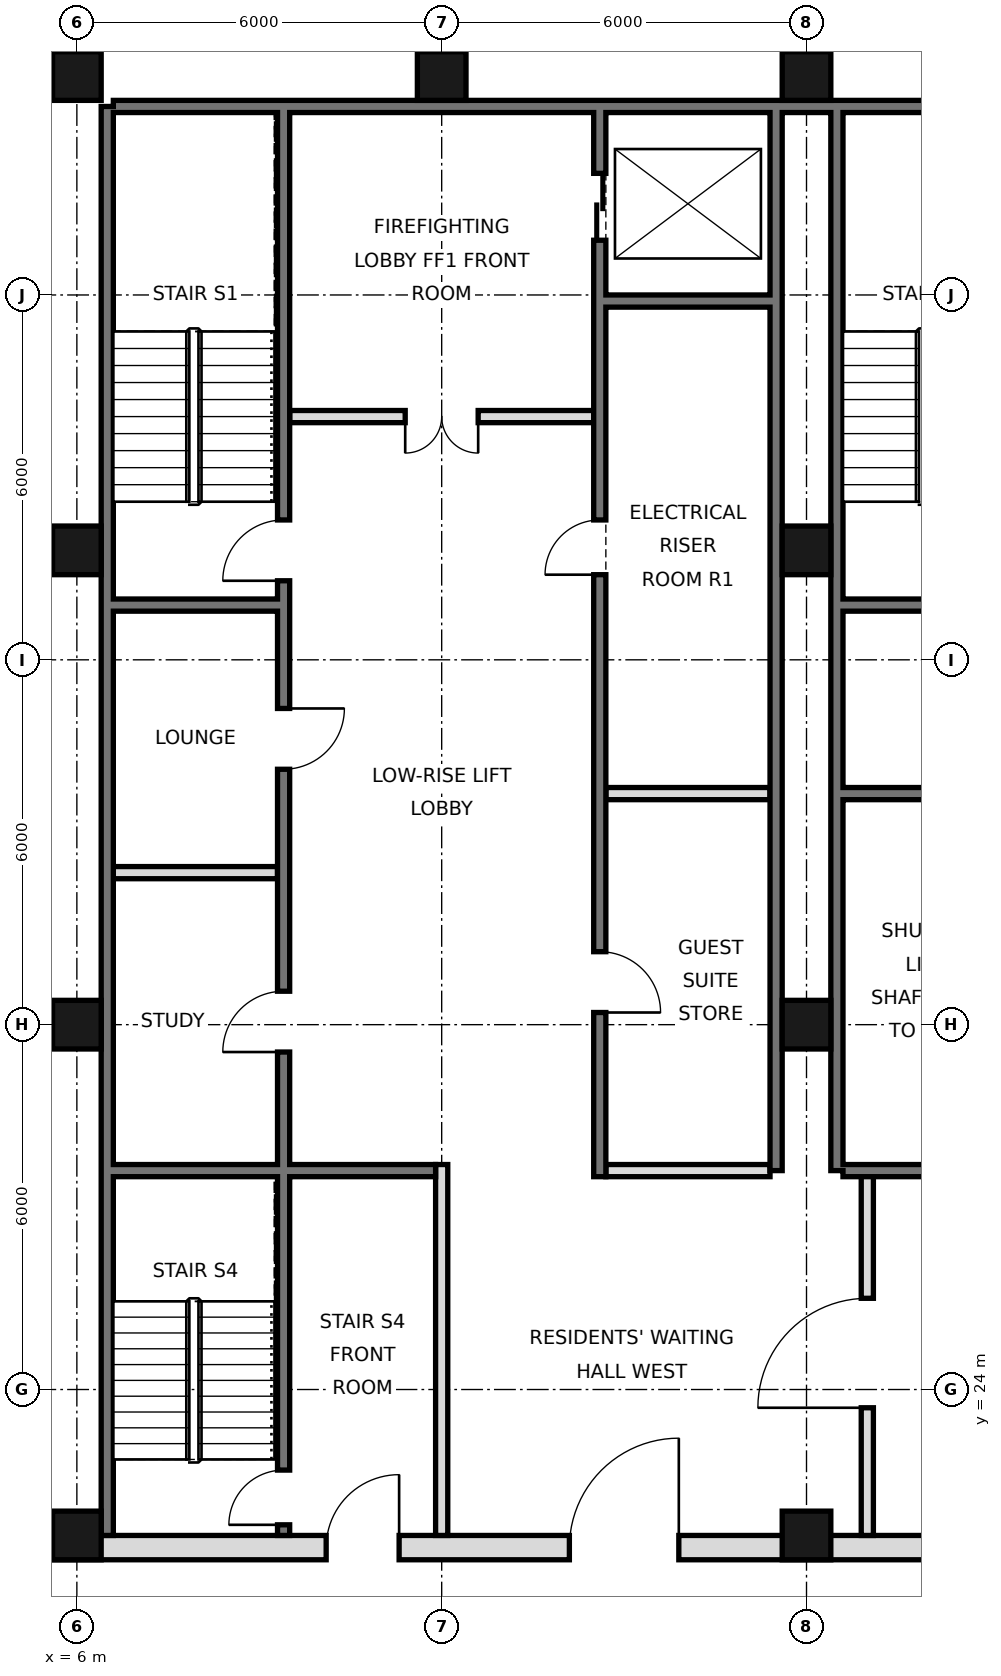
"""IFC4 building model, lengths in metres.
Left out: names, types, materials, properties, quantities, classifications, styles, units other than length and angle.
Written with IfcOpenShell. Run it as: python <this file> out.ifc"""

import sys

from ifc_helpers import new_model, si_unit, direction, frame, frame_2d, origin, origin_2d, place, context, subcontext, project, spatial, rectangle, hollow_rectangle, extrude, element, fill, save


model = new_model("IFC4")
c1 = context("Model", 3, precision=1e-05, world=origin(), true_north=direction((0.0, 1.0)))
c2 = subcontext(c1, "Body", "Model", "MODEL_VIEW")
j1 = project(units=[si_unit("LENGTHUNIT", "METRE"), si_unit("PLANEANGLEUNIT", "RADIAN")], contexts=[c1])
p1 = place(None, origin())
s1 = spatial("IfcSite", under=j1, at=p1, CompositionType="ELEMENT")
p2 = place(p1, origin())
s2 = spatial("IfcBuilding", under=s1, at=p2, CompositionType="ELEMENT")
p3 = place(p2, frame((0.0, 0.0, 174.4)))
s3 = spatial("IfcBuildingStorey", under=s2, at=p3, CompositionType="ELEMENT", Elevation=174.4)
for number, where, z_axis, x_axis in (
    (1, (6.0, 21.6, 0.0), (0.0, 0.0, 1.0), (1.0, 0.0, 0.0)),
    (2, (6.0, 30.0, 0.0), (0.0, 0.0, 1.0), (1.0, 0.0, 0.0)),
    (3, (6.0, 37.8, 0.0), (0.0, 0.0, 1.0), (1.0, 0.0, 0.0)),
    (4, (6.0, 45.6, 0.0), (0.0, 0.0, 1.0), (1.0, 0.0, 0.0)),
    (5, (12.0, 45.6, 0.0), (0.0, 0.0, 1.0), (1.0, 0.0, 0.0)),
    (6, (18.0, 21.6, 0.0), (0.0, 0.0, 1.0), (1.0, 0.0, 0.0)),
    (7, (18.0, 30.0, 0.0), (0.0, 0.0, 1.0), (1.0, 0.0, 0.0)),
    (8, (18.0, 37.8, 0.0), (0.0, 0.0, 1.0), (1.0, 0.0, 0.0)),
    (9, (18.0, 45.6, 0.0), (0.0, 0.0, 1.0), (1.0, 0.0, 0.0)),
):
    element("IfcColumn", number, at=place(p3, frame(where, z_axis=z_axis, x_axis=x_axis)), inside=s3, PredefinedType="COLUMN", context=c2, shape_type="SweptSolid", body=[
        extrude(hollow_rectangle(XDim=0.8, YDim=0.8, WallThickness=0.045, at=origin_2d()), origin(), (0.0, 0.0, 1.0), 3.6),
    ])
p4 = place(p3, frame((6.5, 21.6, 0.0), z_axis=(0.0, 0.0, 1.0), x_axis=(0.0, 1.0, 0.0)))
e10 = element("IfcWall", 10, at=p4, inside=s3, PredefinedType="SOLIDWALL", context=c2, shape_type="SweptSolid", body=[
    extrude(rectangle(XDim=23.5, YDim=0.2, at=frame_2d((11.75, 0.0))), origin(), (0.0, 0.0, 1.0), 3.42),
])
p5 = place(p3, frame((6.6, 45.1, 0.0), z_axis=(0.0, 0.0, 1.0), x_axis=(1.0, 0.0, 0.0)))
e11 = element("IfcWall", 11, at=p5, inside=s3, PredefinedType="SOLIDWALL", context=c2, shape_type="SweptSolid", body=[
    extrude(rectangle(XDim=34.8, YDim=0.2, at=frame_2d((17.4, 0.0))), origin(), (0.0, 0.0, 1.0), 3.42),
])
for number, where, z_axis, x_axis in (
    (12, (17.5, 27.6, 0.0), (0.0, 0.0, 1.0), (0.0, 1.0, 0.0)),
    (13, (18.5, 27.6, 0.0), (0.0, 0.0, 1.0), (0.0, 1.0, 0.0)),
):
    element("IfcWall", number, at=place(p3, frame(where, z_axis=z_axis, x_axis=x_axis)), inside=s3, PredefinedType="SOLIDWALL", context=c2, shape_type="SweptSolid", body=[
        extrude(rectangle(XDim=17.5, YDim=0.2, at=frame_2d((8.75, 0.0))), origin(), (0.0, 0.0, 1.0), 3.42),
    ])
p6 = place(p3, frame((5.6, 21.4, 0.0), z_axis=(0.0, 0.0, 1.0), x_axis=(1.0, 0.0, 0.0)))
e14 = element("IfcWall", 14, at=p6, inside=s3, PredefinedType="SOLIDWALL", context=c2, shape_type="SweptSolid", body=[
    extrude(rectangle(XDim=36.8, YDim=0.4, at=frame_2d((18.4, 0.0))), origin(), (0.0, 0.0, 1.0), 3.42),
])
p7 = place(p6, frame((8.5, 0.0, 0.0)))
e15 = element("IfcOpeningElement", 15, at=p7, cuts=e14, PredefinedType="OPENING", context=c2, shape_type="SweptSolid", body=[
    extrude(rectangle(XDim=1.8, YDim=2.1, at=frame_2d((0.9, 1.05))), frame((0.0, 0.21, 0.0), z_axis=(0.0, -1.0, 0.0), x_axis=(1.0, 0.0, 0.0)), (0.0, 0.0, 1.0), 0.42),
])
p8 = place(p6, frame((17.5, 0.0, 0.0)))
e16 = element("IfcOpeningElement", 16, at=p8, cuts=e14, PredefinedType="OPENING", context=c2, shape_type="SweptSolid", body=[
    extrude(rectangle(XDim=1.8, YDim=2.1, at=frame_2d((0.9, 1.05))), frame((0.0, 0.21, 0.0), z_axis=(0.0, -1.0, 0.0), x_axis=(1.0, 0.0, 0.0)), (0.0, 0.0, 1.0), 0.42),
])
p9 = place(p6, frame((26.5, 0.0, 0.0)))
e17 = element("IfcOpeningElement", 17, at=p9, cuts=e14, PredefinedType="OPENING", context=c2, shape_type="SweptSolid", body=[
    extrude(rectangle(XDim=1.8, YDim=2.1, at=frame_2d((0.9, 1.05))), frame((0.0, 0.21, 0.0), z_axis=(0.0, -1.0, 0.0), x_axis=(1.0, 0.0, 0.0)), (0.0, 0.0, 1.0), 0.42),
])
p10 = place(p6, frame((4.5, 0.0, 0.0)))
e18 = element("IfcOpeningElement", 18, at=p10, cuts=e14, PredefinedType="OPENING", context=c2, shape_type="SweptSolid", body=[
    extrude(rectangle(XDim=1.2, YDim=2.1, at=frame_2d((0.6, 1.05))), frame((0.0, 0.21, 0.0), z_axis=(0.0, -1.0, 0.0), x_axis=(1.0, 0.0, 0.0)), (0.0, 0.0, 1.0), 0.42),
])
p11 = place(p6, frame((31.1, 0.0, 0.0)))
e19 = element("IfcOpeningElement", 19, at=p11, cuts=e14, PredefinedType="OPENING", context=c2, shape_type="SweptSolid", body=[
    extrude(rectangle(XDim=1.2, YDim=2.1, at=frame_2d((0.6, 1.05))), frame((0.0, 0.21, 0.0), z_axis=(0.0, -1.0, 0.0), x_axis=(1.0, 0.0, 0.0)), (0.0, 0.0, 1.0), 0.42),
])
p12 = place(p3, frame((19.0, 21.6, 0.0), z_axis=(0.0, 0.0, 1.0), x_axis=(0.0, 1.0, 0.0)))
e20 = element("IfcWall", 20, at=p12, inside=s3, PredefinedType="PARTITIONING", context=c2, shape_type="SweptSolid", body=[
    extrude(rectangle(XDim=6.0, YDim=0.2, at=frame_2d((3.0, 0.0))), origin(), (0.0, 0.0, 1.0), 3.42),
])
p13 = place(p12, frame((2.1, 0.0, 0.0)))
e21 = element("IfcOpeningElement", 21, at=p13, cuts=e20, PredefinedType="OPENING", context=c2, shape_type="SweptSolid", body=[
    extrude(rectangle(XDim=1.8, YDim=2.1, at=frame_2d((0.9, 1.05))), frame((0.0, 0.11, 0.0), z_axis=(0.0, -1.0, 0.0), x_axis=(1.0, 0.0, 0.0)), (0.0, 0.0, 1.0), 0.22),
])
p14 = place(p3, frame((12.0, 21.6, 0.0), z_axis=(0.0, 0.0, 1.0), x_axis=(0.0, 1.0, 0.0)))
e22 = element("IfcWall", 22, at=p14, inside=s3, PredefinedType="PARTITIONING", context=c2, shape_type="SweptSolid", body=[
    extrude(rectangle(XDim=6.1, YDim=0.2, at=frame_2d((3.05, 0.0))), origin(), (0.0, 0.0, 1.0), 3.42),
])
p15 = place(p3, frame((14.6, 27.5, 0.0), z_axis=(0.0, 0.0, 1.0), x_axis=(0.0, 1.0, 0.0)))
e23 = element("IfcWall", 23, at=p15, inside=s3, PredefinedType="SOLIDWALL", context=c2, shape_type="SweptSolid", body=[
    extrude(rectangle(XDim=17.5, YDim=0.2, at=frame_2d((8.75, 0.0))), origin(), (0.0, 0.0, 1.0), 3.42),
])
p16 = place(p15, frame((15.4, 0.0, 0.0)))
e24 = element("IfcOpeningElement", 24, at=p16, cuts=e23, PredefinedType="OPENING", context=c2, shape_type="SweptSolid", body=[
    extrude(rectangle(XDim=1.1, YDim=2.1, at=frame_2d((0.55, 1.05))), frame((0.0, 0.11, 0.0), z_axis=(0.0, -1.0, 0.0), x_axis=(1.0, 0.0, 0.0)), (0.0, 0.0, 1.0), 0.22),
])
p17 = place(p15, frame((2.7, 0.0, 0.0)))
e25 = element("IfcOpeningElement", 25, at=p17, cuts=e23, PredefinedType="OPENING", context=c2, shape_type="SweptSolid", body=[
    extrude(rectangle(XDim=1.0, YDim=2.1, at=frame_2d((0.5, 1.05))), frame((0.0, 0.11, 0.0), z_axis=(0.0, -1.0, 0.0), x_axis=(1.0, 0.0, 0.0)), (0.0, 0.0, 1.0), 0.22),
])
p18 = place(p15, frame((9.9, 0.0, 0.0)))
e26 = element("IfcOpeningElement", 26, at=p18, cuts=e23, PredefinedType="OPENING", context=c2, shape_type="SweptSolid", body=[
    extrude(rectangle(XDim=0.9, YDim=2.1, at=frame_2d((0.45, 1.05))), frame((0.0, 0.11, 0.0), z_axis=(0.0, -1.0, 0.0), x_axis=(1.0, 0.0, 0.0)), (0.0, 0.0, 1.0), 0.22),
])
p19 = place(p3, frame((9.4, 21.6, 0.0), z_axis=(0.0, 0.0, 1.0), x_axis=(0.0, 1.0, 0.0)))
e27 = element("IfcWall", 27, at=p19, inside=s3, PredefinedType="SOLIDWALL", context=c2, shape_type="SweptSolid", body=[
    extrude(rectangle(XDim=23.4, YDim=0.2, at=frame_2d((11.7, 0.0))), origin(), (0.0, 0.0, 1.0), 3.42),
])
p20 = place(p19, frame((7.95, 0.0, 0.0)))
e28 = element("IfcOpeningElement", 28, at=p20, cuts=e27, PredefinedType="OPENING", context=c2, shape_type="SweptSolid", body=[
    extrude(rectangle(XDim=1.0, YDim=2.1, at=frame_2d((0.5, 1.05))), frame((0.0, 0.11, 0.0), z_axis=(0.0, -1.0, 0.0), x_axis=(1.0, 0.0, 0.0)), (0.0, 0.0, 1.0), 0.22),
])
p21 = place(p19, frame((12.6, 0.0, 0.0)))
e29 = element("IfcOpeningElement", 29, at=p21, cuts=e27, PredefinedType="OPENING", context=c2, shape_type="SweptSolid", body=[
    extrude(rectangle(XDim=1.0, YDim=2.1, at=frame_2d((0.5, 1.05))), frame((0.0, 0.11, 0.0), z_axis=(0.0, -1.0, 0.0), x_axis=(1.0, 0.0, 0.0)), (0.0, 0.0, 1.0), 0.22),
])
p22 = place(p19, frame((15.7, 0.0, 0.0)))
e30 = element("IfcOpeningElement", 30, at=p22, cuts=e27, PredefinedType="OPENING", context=c2, shape_type="SweptSolid", body=[
    extrude(rectangle(XDim=1.0, YDim=2.1, at=frame_2d((0.5, 1.05))), frame((0.0, 0.11, 0.0), z_axis=(0.0, -1.0, 0.0), x_axis=(1.0, 0.0, 0.0)), (0.0, 0.0, 1.0), 0.22),
])
p23 = place(p19, frame((0.175, 0.0, 0.0)))
e31 = element("IfcOpeningElement", 31, at=p23, cuts=e27, PredefinedType="OPENING", context=c2, shape_type="SweptSolid", body=[
    extrude(rectangle(XDim=0.9, YDim=2.1, at=frame_2d((0.45, 1.05))), frame((0.0, 0.11, 0.0), z_axis=(0.0, -1.0, 0.0), x_axis=(1.0, 0.0, 0.0)), (0.0, 0.0, 1.0), 0.22),
])
p24 = place(p3, frame((14.7, 27.6, 0.0), z_axis=(0.0, 0.0, 1.0), x_axis=(1.0, 0.0, 0.0)))
e32 = element("IfcWall", 32, at=p24, inside=s3, PredefinedType="PARTITIONING", context=c2, shape_type="SweptSolid", body=[
    extrude(rectangle(XDim=2.7, YDim=0.2, at=frame_2d((1.35, 0.0))), origin(), (0.0, 0.0, 1.0), 3.42),
])
p25 = place(p3, frame((18.6, 27.6, 0.0), z_axis=(0.0, 0.0, 1.0), x_axis=(1.0, 0.0, 0.0)))
e33 = element("IfcWall", 33, at=p25, inside=s3, PredefinedType="SOLIDWALL", context=c2, shape_type="SweptSolid", body=[
    extrude(rectangle(XDim=2.7, YDim=0.2, at=frame_2d((1.35, 0.0))), origin(), (0.0, 0.0, 1.0), 3.42),
])
p26 = place(p3, frame((6.6, 27.6, 0.0), z_axis=(0.0, 0.0, 1.0), x_axis=(1.0, 0.0, 0.0)))
e34 = element("IfcWall", 34, at=p26, inside=s3, PredefinedType="SOLIDWALL", context=c2, shape_type="SweptSolid", body=[
    extrude(rectangle(XDim=5.3, YDim=0.2, at=frame_2d((2.65, 0.0))), origin(), (0.0, 0.0, 1.0), 3.42),
])
p27 = place(p3, frame((6.6, 32.5, 0.0), z_axis=(0.0, 0.0, 1.0), x_axis=(1.0, 0.0, 0.0)))
e35 = element("IfcWall", 35, at=p27, inside=s3, PredefinedType="PARTITIONING", context=c2, shape_type="SweptSolid", body=[
    extrude(rectangle(XDim=2.7, YDim=0.2, at=frame_2d((1.35, 0.0))), origin(), (0.0, 0.0, 1.0), 3.42),
])
for number, where, z_axis, x_axis in (
    (36, (14.7, 33.8, 0.0), (0.0, 0.0, 1.0), (1.0, 0.0, 0.0)),
    (37, (18.6, 33.8, 0.0), (0.0, 0.0, 1.0), (1.0, 0.0, 0.0)),
    (38, (18.6, 36.9, 0.0), (0.0, 0.0, 1.0), (1.0, 0.0, 0.0)),
    (39, (6.6, 36.9, 0.0), (0.0, 0.0, 1.0), (1.0, 0.0, 0.0)),
):
    element("IfcWall", number, at=place(p3, frame(where, z_axis=z_axis, x_axis=x_axis)), inside=s3, PredefinedType="SOLIDWALL", context=c2, shape_type="SweptSolid", body=[
        extrude(rectangle(XDim=2.7, YDim=0.2, at=frame_2d((1.35, 0.0))), origin(), (0.0, 0.0, 1.0), 3.42),
    ])
p28 = place(p3, frame((9.5, 40.0, 0.0), z_axis=(0.0, 0.0, 1.0), x_axis=(1.0, 0.0, 0.0)))
e40 = element("IfcWall", 40, at=p28, inside=s3, PredefinedType="PARTITIONING", context=c2, shape_type="SweptSolid", body=[
    extrude(rectangle(XDim=5.0, YDim=0.2, at=frame_2d((2.5, 0.0))), origin(), (0.0, 0.0, 1.0), 3.42),
])
p29 = place(p28, frame((1.9, 0.0, 0.0)))
e41 = element("IfcOpeningElement", 41, at=p29, cuts=e40, PredefinedType="OPENING", context=c2, shape_type="SweptSolid", body=[
    extrude(rectangle(XDim=1.2, YDim=2.1, at=frame_2d((0.6, 1.05))), frame((0.0, 0.11, 0.0), z_axis=(0.0, -1.0, 0.0), x_axis=(1.0, 0.0, 0.0)), (0.0, 0.0, 1.0), 0.22),
])
p30 = place(p3, frame((14.7, 41.9, 0.0), z_axis=(0.0, 0.0, 1.0), x_axis=(1.0, 0.0, 0.0)))
e42 = element("IfcWall", 42, at=p30, inside=s3, PredefinedType="SOLIDWALL", context=c2, shape_type="SweptSolid", body=[
    extrude(rectangle(XDim=2.7, YDim=0.2, at=frame_2d((1.35, 0.0))), origin(), (0.0, 0.0, 1.0), 3.42),
])
p31 = place(p7, frame((1.8, 0.0, 0.0), z_axis=(0.0, 0.0, 1.0), x_axis=(-1.0, 0.0, 0.0)))
e43 = element("IfcDoor", 43, at=p31, inside=s3, OperationType="SINGLE_SWING_LEFT", PredefinedType="DOOR", context=c2, shape_type="SweptSolid", body=[
    extrude(rectangle(XDim=1.8, YDim=2.1, at=frame_2d((0.9, 1.05))), frame((0.0, 0.025, 0.0), z_axis=(0.0, -1.0, 0.0), x_axis=(1.0, 0.0, 0.0)), (0.0, 0.0, 1.0), 0.05),
])
fill(e15, e43)
p32 = place(p13, origin())
e44 = element("IfcDoor", 44, at=p32, inside=s3, OperationType="SINGLE_SWING_LEFT", PredefinedType="DOOR", context=c2, shape_type="SweptSolid", body=[
    extrude(rectangle(XDim=1.8, YDim=2.1, at=frame_2d((0.9, 1.05))), frame((0.0, 0.025, 0.0), z_axis=(0.0, -1.0, 0.0), x_axis=(1.0, 0.0, 0.0)), (0.0, 0.0, 1.0), 0.05),
])
fill(e21, e44)
p33 = place(p10, frame((1.2, 0.0, 0.0), z_axis=(0.0, 0.0, 1.0), x_axis=(-1.0, 0.0, 0.0)))
e45 = element("IfcDoor", 45, at=p33, inside=s3, OperationType="SINGLE_SWING_LEFT", PredefinedType="DOOR", context=c2, shape_type="SweptSolid", body=[
    extrude(rectangle(XDim=1.2, YDim=2.1, at=frame_2d((0.6, 1.05))), frame((0.0, 0.025, 0.0), z_axis=(0.0, -1.0, 0.0), x_axis=(1.0, 0.0, 0.0)), (0.0, 0.0, 1.0), 0.05),
])
fill(e18, e45)
p34 = place(p29, frame((1.2, 0.0, 0.0), z_axis=(0.0, 0.0, 1.0), x_axis=(-1.0, 0.0, 0.0)))
e46 = element("IfcDoor", 46, at=p34, inside=s3, OperationType="DOUBLE_DOOR_SINGLE_SWING", PredefinedType="DOOR", context=c2, shape_type="SweptSolid", body=[
    extrude(rectangle(XDim=1.2, YDim=2.1, at=frame_2d((0.6, 1.05))), frame((0.0, 0.025, 0.0), z_axis=(0.0, -1.0, 0.0), x_axis=(1.0, 0.0, 0.0)), (0.0, 0.0, 1.0), 0.05),
])
fill(e41, e46)
p35 = place(p16, origin())
e47 = element("IfcDoor", 47, at=p35, inside=s3, OperationType="DOUBLE_DOOR_SLIDING", PredefinedType="DOOR", context=c2, shape_type="SweptSolid", body=[
    extrude(rectangle(XDim=1.1, YDim=2.1, at=frame_2d((0.55, 1.05))), frame((0.0, 0.025, 0.0), z_axis=(0.0, -1.0, 0.0), x_axis=(1.0, 0.0, 0.0)), (0.0, 0.0, 1.0), 0.05),
])
fill(e24, e47)
p36 = place(p17, frame((1.0, 0.0, 0.0), z_axis=(0.0, 0.0, 1.0), x_axis=(-1.0, 0.0, 0.0)))
e48 = element("IfcDoor", 48, at=p36, inside=s3, OperationType="SINGLE_SWING_RIGHT", PredefinedType="DOOR", context=c2, shape_type="SweptSolid", body=[
    extrude(rectangle(XDim=1.0, YDim=2.1, at=frame_2d((0.5, 1.05))), frame((0.0, 0.025, 0.0), z_axis=(0.0, -1.0, 0.0), x_axis=(1.0, 0.0, 0.0)), (0.0, 0.0, 1.0), 0.05),
])
fill(e25, e48)
p37 = place(p20, origin())
e49 = element("IfcDoor", 49, at=p37, inside=s3, OperationType="SINGLE_SWING_LEFT", PredefinedType="DOOR", context=c2, shape_type="SweptSolid", body=[
    extrude(rectangle(XDim=1.0, YDim=2.1, at=frame_2d((0.5, 1.05))), frame((0.0, 0.025, 0.0), z_axis=(0.0, -1.0, 0.0), x_axis=(1.0, 0.0, 0.0)), (0.0, 0.0, 1.0), 0.05),
])
fill(e28, e49)
p38 = place(p21, origin())
e50 = element("IfcDoor", 50, at=p38, inside=s3, OperationType="SINGLE_SWING_RIGHT", PredefinedType="DOOR", context=c2, shape_type="SweptSolid", body=[
    extrude(rectangle(XDim=1.0, YDim=2.1, at=frame_2d((0.5, 1.05))), frame((0.0, 0.025, 0.0), z_axis=(0.0, -1.0, 0.0), x_axis=(1.0, 0.0, 0.0)), (0.0, 0.0, 1.0), 0.05),
])
fill(e29, e50)
p39 = place(p22, origin())
e51 = element("IfcDoor", 51, at=p39, inside=s3, OperationType="SINGLE_SWING_LEFT", PredefinedType="DOOR", context=c2, shape_type="SweptSolid", body=[
    extrude(rectangle(XDim=1.0, YDim=2.1, at=frame_2d((0.5, 1.05))), frame((0.0, 0.025, 0.0), z_axis=(0.0, -1.0, 0.0), x_axis=(1.0, 0.0, 0.0)), (0.0, 0.0, 1.0), 0.05),
])
fill(e30, e51)
p40 = place(p23, origin())
e52 = element("IfcDoor", 52, at=p40, inside=s3, OperationType="SINGLE_SWING_LEFT", PredefinedType="DOOR", context=c2, shape_type="SweptSolid", body=[
    extrude(rectangle(XDim=0.9, YDim=2.1, at=frame_2d((0.45, 1.05))), frame((0.0, 0.025, 0.0), z_axis=(0.0, -1.0, 0.0), x_axis=(1.0, 0.0, 0.0)), (0.0, 0.0, 1.0), 0.05),
])
fill(e31, e52)
p41 = place(p18, origin())
e53 = element("IfcDoor", 53, at=p41, inside=s3, OperationType="SINGLE_SWING_LEFT", PredefinedType="DOOR", context=c2, shape_type="SweptSolid", body=[
    extrude(rectangle(XDim=0.9, YDim=2.1, at=frame_2d((0.45, 1.05))), frame((0.0, 0.025, 0.0), z_axis=(0.0, -1.0, 0.0), x_axis=(1.0, 0.0, 0.0)), (0.0, 0.0, 1.0), 0.05),
])
fill(e26, e53)
save(model, sys.argv[1])
